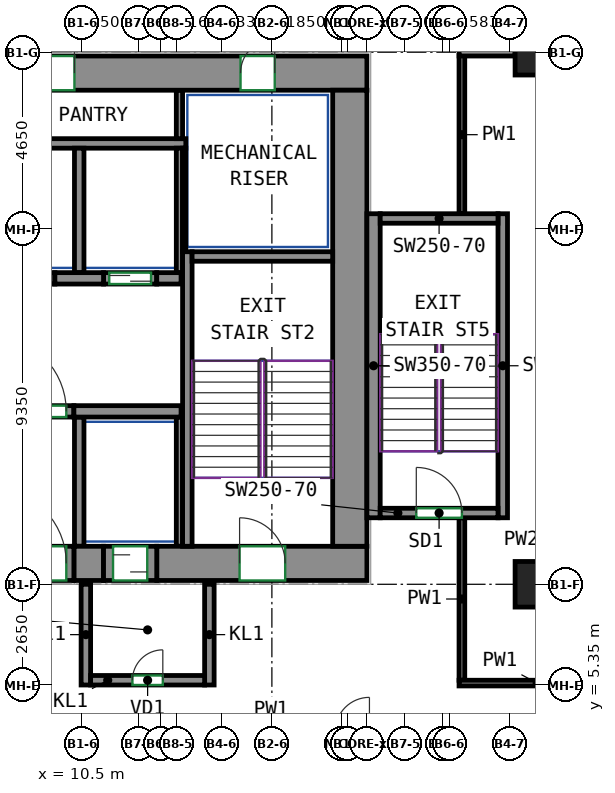
"""IFC4 building model, lengths in metres.
Left out: names, types, materials, properties, quantities, classifications, styles, units other than length and angle.
Written with IfcOpenShell. Run it as: python <this file> out.ifc"""

import sys

from ifc_helpers import new_model, si_unit, direction, frame, frame_2d, origin, origin_2d, place, context, subcontext, project, spatial, rectangle, extrude, source, transform, mapped, element, fill, save


model = new_model("IFC4")
c1 = context("Model", 3, precision=1e-05, world=origin(), true_north=direction((0.0, 1.0)))
c2 = subcontext(c1, "Body", "Model", "MODEL_VIEW")
j1 = project(units=[si_unit("LENGTHUNIT", "METRE"), si_unit("PLANEANGLEUNIT", "RADIAN")], contexts=[c1])
p1 = place(None, origin())
s1 = spatial("IfcSite", under=j1, at=p1, CompositionType="ELEMENT")
p2 = place(p1, origin())
s2 = spatial("IfcBuilding", under=s1, at=p2, CompositionType="ELEMENT")
p3 = place(p2, frame((0.0, 0.0, 116.6)))
s3 = spatial("IfcBuildingStorey", under=s2, at=p3, CompositionType="ELEMENT", Elevation=116.6)
m1 = source(origin(), c2, "Body", "SweptSolid", [
    extrude(rectangle(XDim=1.2, YDim=1.2, at=origin_2d()), origin(), (0.0, 0.0, 1.0), 3.72),
])
for number, where, z_axis, x_axis in (
    (1, (22.5, 8.0, 0.0), (0.0, 0.0, 1.0), (1.0, 0.0, 0.0)),
    (2, (22.5, 22.0, 0.0), (0.0, 0.0, 1.0), (1.0, 0.0, 0.0)),
):
    element("IfcColumn", number, at=place(p3, frame(where, z_axis=z_axis, x_axis=x_axis)), inside=s3, PredefinedType="COLUMN", context=c2, shape_type="MappedRepresentation", body=[
        mapped(m1, transform((0.0, 0.0, 0.0))),
    ])
m2 = source(origin(), c2, "Body", "SweptSolid", [
    extrude(rectangle(XDim=0.78, YDim=0.9, at=frame_2d((0.39, 0.0))), origin(), (0.0, 0.0, 1.0), 3.72),
])
p4 = place(p3, frame((10.29, 8.55, 0.0), z_axis=(0.0, 0.0, 1.0), x_axis=(1.0, 0.0, 0.0)))
e3 = element("IfcWall", 3, at=p4, inside=s3, PredefinedType="SHEAR", context=c2, shape_type="MappedRepresentation", body=[
    mapped(m2, transform((0.0, 0.0, 0.0))),
])
m3 = source(origin(), c2, "Body", "SweptSolid", [
    extrude(rectangle(XDim=5.53, YDim=0.9, at=frame_2d((2.765, 0.0))), origin(), (0.0, 0.0, 1.0), 3.72),
])
p5 = place(p3, frame((12.47, 8.55, 0.0), z_axis=(0.0, 0.0, 1.0), x_axis=(1.0, 0.0, 0.0)))
e4 = element("IfcWall", 4, at=p5, inside=s3, PredefinedType="SHEAR", context=c2, shape_type="MappedRepresentation", body=[
    mapped(m3, transform((0.0, 0.0, 0.0))),
])
p6 = place(p5, frame((2.18, 0.0, 0.0)))
e5 = element("IfcOpeningElement", 5, at=p6, cuts=e4, PredefinedType="OPENING", context=c2, shape_type="SweptSolid", body=[
    extrude(rectangle(XDim=1.2, YDim=2.1, at=frame_2d((0.6, 1.05))), frame((0.0, 0.46, 0.0), z_axis=(0.0, -1.0, 0.0), x_axis=(1.0, 0.0, 0.0)), (0.0, 0.0, 1.0), 0.92),
])
m4 = source(origin(), c2, "Body", "SweptSolid", [
    extrude(rectangle(XDim=33.9, YDim=0.9, at=frame_2d((16.95, 0.0))), origin(), (0.0, 0.0, 1.0), 3.72),
])
p7 = place(p3, frame((-15.9, 21.45, 0.0), z_axis=(0.0, 0.0, 1.0), x_axis=(1.0, 0.0, 0.0)))
e6 = element("IfcWall", 6, at=p7, inside=s3, PredefinedType="SHEAR", context=c2, shape_type="MappedRepresentation", body=[
    mapped(m4, transform((0.0, 0.0, 0.0))),
])
p8 = place(p7, frame((7.12, 0.0, 0.0)))
e7 = element("IfcOpeningElement", 7, at=p8, cuts=e6, PredefinedType="OPENING", context=c2, shape_type="SweptSolid", body=[
    extrude(rectangle(XDim=0.9, YDim=2.1, at=frame_2d((0.45, 1.05))), frame((0.0, 0.46, 0.0), z_axis=(0.0, -1.0, 0.0), x_axis=(1.0, 0.0, 0.0)), (0.0, 0.0, 1.0), 0.92),
])
p9 = place(p7, frame((11.1, 0.0, 0.0)))
e8 = element("IfcOpeningElement", 8, at=p9, cuts=e6, PredefinedType="OPENING", context=c2, shape_type="SweptSolid", body=[
    extrude(rectangle(XDim=0.9, YDim=2.1, at=frame_2d((0.45, 1.05))), frame((0.0, 0.46, 0.0), z_axis=(0.0, -1.0, 0.0), x_axis=(1.0, 0.0, 0.0)), (0.0, 0.0, 1.0), 0.92),
])
p10 = place(p7, frame((14.45, 0.0, 0.0)))
e9 = element("IfcOpeningElement", 9, at=p10, cuts=e6, PredefinedType="OPENING", context=c2, shape_type="SweptSolid", body=[
    extrude(rectangle(XDim=0.9, YDim=2.1, at=frame_2d((0.45, 1.05))), frame((0.0, 0.46, 0.0), z_axis=(0.0, -1.0, 0.0), x_axis=(1.0, 0.0, 0.0)), (0.0, 0.0, 1.0), 0.92),
])
p11 = place(p7, frame((19.274, 0.0, 0.0)))
e10 = element("IfcOpeningElement", 10, at=p11, cuts=e6, PredefinedType="OPENING", context=c2, shape_type="SweptSolid", body=[
    extrude(rectangle(XDim=0.9, YDim=2.1, at=frame_2d((0.45, 1.05))), frame((0.0, 0.46, 0.0), z_axis=(0.0, -1.0, 0.0), x_axis=(1.0, 0.0, 0.0)), (0.0, 0.0, 1.0), 0.92),
])
p12 = place(p7, frame((25.304, 0.0, 0.0)))
e11 = element("IfcOpeningElement", 11, at=p12, cuts=e6, PredefinedType="OPENING", context=c2, shape_type="SweptSolid", body=[
    extrude(rectangle(XDim=0.9, YDim=2.1, at=frame_2d((0.45, 1.05))), frame((0.0, 0.46, 0.0), z_axis=(0.0, -1.0, 0.0), x_axis=(1.0, 0.0, 0.0)), (0.0, 0.0, 1.0), 0.92),
])
p13 = place(p7, frame((2.425, 0.0, 0.0)))
e12 = element("IfcOpeningElement", 12, at=p13, cuts=e6, PredefinedType="OPENING", context=c2, shape_type="SweptSolid", body=[
    extrude(rectangle(XDim=0.9, YDim=2.1, at=frame_2d((0.45, 1.05))), frame((0.0, 0.46, 0.0), z_axis=(0.0, -1.0, 0.0), x_axis=(1.0, 0.0, 0.0)), (0.0, 0.0, 1.0), 0.92),
])
p14 = place(p7, frame((30.575, 0.0, 0.0)))
e13 = element("IfcOpeningElement", 13, at=p14, cuts=e6, PredefinedType="OPENING", context=c2, shape_type="SweptSolid", body=[
    extrude(rectangle(XDim=0.9, YDim=2.1, at=frame_2d((0.45, 1.05))), frame((0.0, 0.46, 0.0), z_axis=(0.0, -1.0, 0.0), x_axis=(1.0, 0.0, 0.0)), (0.0, 0.0, 1.0), 0.92),
])
m5 = source(origin(), c2, "Body", "SweptSolid", [
    extrude(rectangle(XDim=12.0, YDim=0.9, at=frame_2d((6.0, 0.0))), origin(), (0.0, 0.0, 1.0), 3.72),
])
p15 = place(p3, frame((17.55, 9.0, 0.0), z_axis=(0.0, 0.0, 1.0), x_axis=(0.0, 1.0, 0.0)))
e14 = element("IfcWall", 14, at=p15, inside=s3, PredefinedType="SHEAR", context=c2, shape_type="MappedRepresentation", body=[
    mapped(m5, transform((0.0, 0.0, 0.0))),
])
m6 = source(origin(), c2, "Body", "SweptSolid", [
    extrude(rectangle(XDim=7.75, YDim=0.25, at=frame_2d((3.875, 0.0))), origin(), (0.0, 0.0, 1.0), 3.72),
])
p16 = place(p3, frame((13.275, 9.0, 0.0), z_axis=(0.0, 0.0, 1.0), x_axis=(0.0, 1.0, 0.0)))
e15 = element("IfcWall", 15, at=p16, inside=s3, PredefinedType="SHEAR", context=c2, shape_type="MappedRepresentation", body=[
    mapped(m6, transform((0.0, 0.0, 0.0))),
])
m7 = source(origin(), c2, "Body", "SweptSolid", [
    extrude(rectangle(XDim=3.7, YDim=0.25, at=frame_2d((1.85, 0.0))), origin(), (0.0, 0.0, 1.0), 3.72),
])
p17 = place(p3, frame((13.4, 16.625, 0.0), z_axis=(0.0, 0.0, 1.0), x_axis=(1.0, 0.0, 0.0)))
e16 = element("IfcWall", 16, at=p17, inside=s3, PredefinedType="SHEAR", context=c2, shape_type="MappedRepresentation", body=[
    mapped(m7, transform((0.0, 0.0, 0.0))),
])
m8 = source(origin(), c2, "Body", "SweptSolid", [
    extrude(rectangle(XDim=8.0, YDim=0.35, at=frame_2d((4.0, 0.0))), origin(), (0.0, 0.0, 1.0), 3.72),
])
p18 = place(p3, frame((18.175, 9.75, 0.0), z_axis=(0.0, 0.0, 1.0), x_axis=(0.0, 1.0, 0.0)))
e17 = element("IfcWall", 17, at=p18, inside=s3, PredefinedType="SHEAR", context=c2, shape_type="MappedRepresentation", body=[
    mapped(m8, transform((0.0, 0.0, 0.0))),
])
m9 = source(origin(), c2, "Body", "SweptSolid", [
    extrude(rectangle(XDim=8.0, YDim=0.25, at=frame_2d((4.0, 0.0))), origin(), (0.0, 0.0, 1.0), 3.72),
])
p19 = place(p3, frame((21.575, 9.75, 0.0), z_axis=(0.0, 0.0, 1.0), x_axis=(0.0, 1.0, 0.0)))
e18 = element("IfcWall", 18, at=p19, inside=s3, PredefinedType="SHEAR", context=c2, shape_type="MappedRepresentation", body=[
    mapped(m9, transform((0.0, 0.0, 0.0))),
])
m10 = source(origin(), c2, "Body", "SweptSolid", [
    extrude(rectangle(XDim=3.1, YDim=0.25, at=frame_2d((1.55, 0.0))), origin(), (0.0, 0.0, 1.0), 3.72),
])
p20 = place(p3, frame((18.35, 9.875, 0.0), z_axis=(0.0, 0.0, 1.0), x_axis=(1.0, 0.0, 0.0)))
e19 = element("IfcWall", 19, at=p20, inside=s3, PredefinedType="SHEAR", context=c2, shape_type="MappedRepresentation", body=[
    mapped(m10, transform((0.0, 0.0, 0.0))),
])
p21 = place(p20, frame((0.95, 0.0, 0.0)))
e20 = element("IfcOpeningElement", 20, at=p21, cuts=e19, PredefinedType="OPENING", context=c2, shape_type="SweptSolid", body=[
    extrude(rectangle(XDim=1.2, YDim=2.1, at=frame_2d((0.6, 1.05))), frame((0.0, 0.135, 0.0), z_axis=(0.0, -1.0, 0.0), x_axis=(1.0, 0.0, 0.0)), (0.0, 0.0, 1.0), 0.27),
])
p22 = place(p3, frame((18.35, 17.625, 0.0), z_axis=(0.0, 0.0, 1.0), x_axis=(1.0, 0.0, 0.0)))
e21 = element("IfcWall", 21, at=p22, inside=s3, PredefinedType="SHEAR", context=c2, shape_type="MappedRepresentation", body=[
    mapped(m10, transform((0.0, 0.0, 0.0))),
])
m11 = source(origin(), c2, "Body", "SweptSolid", [
    extrude(rectangle(XDim=2.82, YDim=0.3, at=frame_2d((1.41, 0.0))), origin(), (0.0, 0.0, 1.0), 3.72),
])
p23 = place(p3, frame((10.29, 12.55, 0.0), z_axis=(0.0, 0.0, 1.0), x_axis=(1.0, 0.0, 0.0)))
e22 = element("IfcWall", 22, at=p23, inside=s3, PredefinedType="SHEAR", context=c2, shape_type="MappedRepresentation", body=[
    mapped(m11, transform((0.0, 0.0, 0.0))),
])
m12 = source(origin(), c2, "Body", "SweptSolid", [
    extrude(rectangle(XDim=1.28, YDim=0.3, at=frame_2d((0.64, 0.0))), origin(), (0.0, 0.0, 1.0), 3.72),
])
p24 = place(p3, frame((9.79, 16.05, 0.0), z_axis=(0.0, 0.0, 1.0), x_axis=(1.0, 0.0, 0.0)))
e23 = element("IfcWall", 23, at=p24, inside=s3, PredefinedType="SHEAR", context=c2, shape_type="MappedRepresentation", body=[
    mapped(m12, transform((0.0, 0.0, 0.0))),
])
m13 = source(origin(), c2, "Body", "SweptSolid", [
    extrude(rectangle(XDim=0.64, YDim=0.3, at=frame_2d((0.32, 0.0))), origin(), (0.0, 0.0, 1.0), 3.72),
])
p25 = place(p3, frame((12.47, 16.05, 0.0), z_axis=(0.0, 0.0, 1.0), x_axis=(1.0, 0.0, 0.0)))
e24 = element("IfcWall", 24, at=p25, inside=s3, PredefinedType="SHEAR", context=c2, shape_type="MappedRepresentation", body=[
    mapped(m13, transform((0.0, 0.0, 0.0))),
])
m14 = source(origin(), c2, "Body", "SweptSolid", [
    extrude(rectangle(XDim=1.4, YDim=0.3, at=frame_2d((0.7, 0.0))), origin(), (0.0, 0.0, 1.0), 3.72),
])
p26 = place(p3, frame((11.07, 16.05, 0.0), z_axis=(0.0, 0.0, 1.0), x_axis=(1.0, 0.0, 0.0)))
e25 = element("IfcWall", 25, at=p26, inside=s3, PredefinedType="PARTITIONING", context=c2, shape_type="MappedRepresentation", body=[
    mapped(m14, transform((0.0, 0.0, 0.0))),
])
p27 = place(p26, frame((0.15, 0.0, 0.0)))
e26 = element("IfcOpeningElement", 26, at=p27, cuts=e25, PredefinedType="OPENING", context=c2, shape_type="SweptSolid", body=[
    extrude(rectangle(XDim=1.1, YDim=2.1, at=frame_2d((0.55, 1.05))), frame((0.0, 0.16, 0.0), z_axis=(0.0, -1.0, 0.0), x_axis=(1.0, 0.0, 0.0)), (0.0, 0.0, 1.0), 0.32),
])
m15 = source(origin(), c2, "Body", "SweptSolid", [
    extrude(rectangle(XDim=2.4, YDim=0.3, at=frame_2d((1.2, 0.0))), origin(), (0.0, 0.0, 1.0), 3.72),
])
p28 = place(p3, frame((7.89, 12.55, 0.0), z_axis=(0.0, 0.0, 1.0), x_axis=(1.0, 0.0, 0.0)))
e27 = element("IfcWall", 27, at=p28, inside=s3, PredefinedType="PARTITIONING", context=c2, shape_type="MappedRepresentation", body=[
    mapped(m15, transform((0.0, 0.0, 0.0))),
])
p29 = place(p28, frame((0.2, 0.0, 0.0)))
e28 = element("IfcOpeningElement", 28, at=p29, cuts=e27, PredefinedType="OPENING", context=c2, shape_type="SweptSolid", body=[
    extrude(rectangle(XDim=2.0, YDim=2.1, at=frame_2d((1.0, 1.05))), frame((0.0, 0.16, 0.0), z_axis=(0.0, -1.0, 0.0), x_axis=(1.0, 0.0, 0.0)), (0.0, 0.0, 1.0), 0.32),
])
m16 = source(origin(), c2, "Body", "SweptSolid", [
    extrude(rectangle(XDim=1.4, YDim=0.3, at=frame_2d((0.7, 0.0))), origin(), (0.0, 0.0, 1.0), 3.72),
])
p30 = place(p3, frame((8.39, 16.05, 0.0), z_axis=(0.0, 0.0, 1.0), x_axis=(1.0, 0.0, 0.0)))
e29 = element("IfcWall", 29, at=p30, inside=s3, PredefinedType="PARTITIONING", context=c2, shape_type="MappedRepresentation", body=[
    mapped(m16, transform((0.0, 0.0, 0.0))),
])
m17 = source(origin(), c2, "Body", "SweptSolid", [
    extrude(rectangle(XDim=2.65, YDim=0.25, at=frame_2d((1.325, 0.0))), origin(), (0.0, 0.0, 1.0), 3.72),
])
for number, where, z_axis, x_axis in (
    (30, (10.605, 5.35, 0.0), (0.0, 0.0, 1.0), (0.0, 1.0, 0.0)),
    (31, (13.855, 5.35, 0.0), (0.0, 0.0, 1.0), (0.0, 1.0, 0.0)),
):
    element("IfcWall", number, at=place(p3, frame(where, z_axis=z_axis, x_axis=x_axis)), inside=s3, PredefinedType="PARTITIONING", context=c2, shape_type="MappedRepresentation", body=[
        mapped(m17, transform((0.0, 0.0, 0.0))),
    ])
m18 = source(origin(), c2, "Body", "SweptSolid", [
    extrude(rectangle(XDim=3.0, YDim=0.25, at=frame_2d((1.5, 0.0))), origin(), (0.0, 0.0, 1.0), 3.72),
])
p31 = place(p3, frame((10.73, 5.475, 0.0), z_axis=(0.0, 0.0, 1.0), x_axis=(1.0, 0.0, 0.0)))
e32 = element("IfcWall", 32, at=p31, inside=s3, PredefinedType="PARTITIONING", context=c2, shape_type="MappedRepresentation", body=[
    mapped(m18, transform((0.0, 0.0, 0.0))),
])
p32 = place(p31, frame((1.1, 0.0, 0.0)))
e33 = element("IfcOpeningElement", 33, at=p32, cuts=e32, PredefinedType="OPENING", context=c2, shape_type="SweptSolid", body=[
    extrude(rectangle(XDim=0.8, YDim=2.0, at=frame_2d((0.4, 1.0))), frame((0.0, 0.135, 0.0), z_axis=(0.0, -1.0, 0.0), x_axis=(1.0, 0.0, 0.0)), (0.0, 0.0, 1.0), 0.27),
])
m19 = source(origin(), c2, "Body", "SweptSolid", [
    extrude(rectangle(XDim=19.01, YDim=0.25, at=frame_2d((9.505, 0.0))), origin(), (0.0, 0.0, 1.0), 3.72),
])
p33 = place(p3, frame((-5.775, 19.6, 0.0), z_axis=(0.0, 0.0, 1.0), x_axis=(1.0, 0.0, 0.0)))
e34 = element("IfcWall", 34, at=p33, inside=s3, PredefinedType="PARTITIONING", context=c2, shape_type="MappedRepresentation", body=[
    mapped(m19, transform((0.0, 0.0, 0.0))),
])
m20 = source(origin(), c2, "Body", "SweptSolid", [
    extrude(rectangle(XDim=3.275, YDim=0.165, at=frame_2d((1.638, 0.0))), origin(), (0.0, 0.0, 1.0), 3.72),
])
p34 = place(p3, frame((13.067, 16.2, 0.0), z_axis=(0.0, 0.0, 1.0), x_axis=(0.0, 1.0, 0.0)))
e35 = element("IfcWall", 35, at=p34, inside=s3, PredefinedType="PARTITIONING", context=c2, shape_type="MappedRepresentation", body=[
    mapped(m20, transform((0.0, 0.0, 0.0))),
])
m21 = source(origin(), c2, "Body", "SweptSolid", [
    extrude(rectangle(XDim=1.275, YDim=0.165, at=frame_2d((0.637, 0.0))), origin(), (0.0, 0.0, 1.0), 3.72),
])
p35 = place(p3, frame((13.067, 19.725, 0.0), z_axis=(0.0, 0.0, 1.0), x_axis=(0.0, 1.0, 0.0)))
e36 = element("IfcWall", 36, at=p35, inside=s3, PredefinedType="PARTITIONING", context=c2, shape_type="MappedRepresentation", body=[
    mapped(m21, transform((0.0, 0.0, 0.0))),
])
m22 = source(origin(), c2, "Body", "SweptSolid", [
    extrude(rectangle(XDim=3.275, YDim=0.25, at=frame_2d((1.638, 0.0))), origin(), (0.0, 0.0, 1.0), 3.72),
])
p36 = place(p3, frame((10.43, 16.2, 0.0), z_axis=(0.0, 0.0, 1.0), x_axis=(0.0, 1.0, 0.0)))
e37 = element("IfcWall", 37, at=p36, inside=s3, PredefinedType="PARTITIONING", context=c2, shape_type="MappedRepresentation", body=[
    mapped(m22, transform((0.0, 0.0, 0.0))),
])
m23 = source(origin(), c2, "Body", "SweptSolid", [
    extrude(rectangle(XDim=2.725, YDim=0.085, at=frame_2d((1.363, 0.0))), origin(), (0.0, 0.0, 1.0), 3.72),
])
p37 = place(p3, frame((13.192, 16.75, 0.0), z_axis=(0.0, 0.0, 1.0), x_axis=(0.0, 1.0, 0.0)))
e38 = element("IfcWall", 38, at=p37, inside=s3, PredefinedType="PARTITIONING", context=c2, shape_type="MappedRepresentation", body=[
    mapped(m23, transform((0.0, 0.0, 0.0))),
])
m24 = source(origin(), c2, "Body", "SweptSolid", [
    extrude(rectangle(XDim=3.4, YDim=0.25, at=frame_2d((1.7, 0.0))), origin(), (0.0, 0.0, 1.0), 3.72),
])
p38 = place(p3, frame((10.43, 9.0, 0.0), z_axis=(0.0, 0.0, 1.0), x_axis=(0.0, 1.0, 0.0)))
e39 = element("IfcWall", 39, at=p38, inside=s3, PredefinedType="PARTITIONING", context=c2, shape_type="MappedRepresentation", body=[
    mapped(m24, transform((0.0, 0.0, 0.0))),
])
m25 = source(origin(), c2, "Body", "SweptSolid", [
    extrude(rectangle(XDim=3.4, YDim=0.165, at=frame_2d((1.7, 0.0))), origin(), (0.0, 0.0, 1.0), 3.72),
])
p39 = place(p3, frame((13.067, 9.0, 0.0), z_axis=(0.0, 0.0, 1.0), x_axis=(0.0, 1.0, 0.0)))
e40 = element("IfcWall", 40, at=p39, inside=s3, PredefinedType="PARTITIONING", context=c2, shape_type="MappedRepresentation", body=[
    mapped(m25, transform((0.0, 0.0, 0.0))),
])
m26 = source(origin(), c2, "Body", "SweptSolid", [
    extrude(rectangle(XDim=2.4, YDim=0.9, at=frame_2d((1.2, 0.0))), origin(), (0.0, 0.0, 1.0), 2.7),
])
p40 = place(p3, frame((7.89, 8.55, 0.0), z_axis=(0.0, 0.0, 1.0), x_axis=(1.0, 0.0, 0.0)))
e41 = element("IfcWall", 41, at=p40, inside=s3, PredefinedType="PARTITIONING", context=c2, shape_type="MappedRepresentation", body=[
    mapped(m26, transform((0.0, 0.0, 0.0))),
])
p41 = place(p40, frame((0.2, 0.0, 0.0)))
e42 = element("IfcOpeningElement", 42, at=p41, cuts=e41, PredefinedType="OPENING", context=c2, shape_type="SweptSolid", body=[
    extrude(rectangle(XDim=2.0, YDim=2.1, at=frame_2d((1.0, 1.05))), frame((0.0, 0.46, 0.0), z_axis=(0.0, -1.0, 0.0), x_axis=(1.0, 0.0, 0.0)), (0.0, 0.0, 1.0), 0.92),
])
m27 = source(origin(), c2, "Body", "SweptSolid", [
    extrude(rectangle(XDim=1.4, YDim=0.9, at=frame_2d((0.7, 0.0))), origin(), (0.0, 0.0, 1.0), 2.7),
])
p42 = place(p3, frame((11.07, 8.55, 0.0), z_axis=(0.0, 0.0, 1.0), x_axis=(1.0, 0.0, 0.0)))
e43 = element("IfcWall", 43, at=p42, inside=s3, PredefinedType="PARTITIONING", context=c2, shape_type="MappedRepresentation", body=[
    mapped(m27, transform((0.0, 0.0, 0.0))),
])
p43 = place(p42, frame((0.25, 0.0, 0.0)))
e44 = element("IfcOpeningElement", 44, at=p43, cuts=e43, PredefinedType="OPENING", context=c2, shape_type="SweptSolid", body=[
    extrude(rectangle(XDim=0.9, YDim=2.1, at=frame_2d((0.45, 1.05))), frame((0.0, 0.46, 0.0), z_axis=(0.0, -1.0, 0.0), x_axis=(1.0, 0.0, 0.0)), (0.0, 0.0, 1.0), 0.92),
])
p44 = place(p3, frame((20.5, 17.75, 0.0), z_axis=(0.0, 0.0, 1.0), x_axis=(0.0, 1.0, 0.0)))
e45 = element("IfcWall", 45, at=p44, inside=s3, PredefinedType="PARTITIONING", context=c2, shape_type="SweptSolid", body=[
    extrude(rectangle(XDim=4.16, YDim=0.15, at=frame_2d((2.08, 0.0))), origin(), (0.0, 0.0, 1.0), 3.72),
])
p45 = place(p3, frame((20.5, 5.475, 0.0), z_axis=(0.0, 0.0, 1.0), x_axis=(0.0, 1.0, 0.0)))
e46 = element("IfcWall", 46, at=p45, inside=s3, PredefinedType="PARTITIONING", context=c2, shape_type="SweptSolid", body=[
    extrude(rectangle(XDim=4.275, YDim=0.15, at=frame_2d((2.137, 0.0))), origin(), (0.0, 0.0, 1.0), 3.72),
])
p46 = place(p3, frame((20.425, 5.4, 0.0), z_axis=(0.0, 0.0, 1.0), x_axis=(1.0, 0.0, 0.0)))
e47 = element("IfcWall", 47, at=p46, inside=s3, PredefinedType="PARTITIONING", context=c2, shape_type="SweptSolid", body=[
    extrude(rectangle(XDim=6.85, YDim=0.15, at=frame_2d((3.425, 0.0))), origin(), (0.0, 0.0, 1.0), 3.72),
])
p47 = place(p46, frame((2.752, 0.0, 0.0)))
e48 = element("IfcOpeningElement", 48, at=p47, cuts=e47, PredefinedType="OPENING", context=c2, shape_type="SweptSolid", body=[
    extrude(rectangle(XDim=1.0, YDim=2.1, at=frame_2d((0.5, 1.05))), frame((0.0, 0.085, 0.0), z_axis=(0.0, -1.0, 0.0), x_axis=(1.0, 0.0, 0.0)), (0.0, 0.0, 1.0), 0.17),
])
p48 = place(p3, frame((20.426, 22.0, 0.0), z_axis=(0.0, 0.0, 1.0), x_axis=(1.0, 0.0, 0.0)))
e49 = element("IfcWall", 49, at=p48, inside=s3, PredefinedType="PARTITIONING", context=c2, shape_type="SweptSolid", body=[
    extrude(rectangle(XDim=1.474, YDim=0.2, at=frame_2d((0.737, 0.0))), origin(), (0.0, 0.0, 1.0), 3.72),
])
p49 = place(p29, origin())
e50 = element("IfcDoor", 50, at=p49, inside=s3, OperationType="DOUBLE_DOOR_SINGLE_SWING", PredefinedType="DOOR", context=c2, shape_type="SweptSolid", body=[
    extrude(rectangle(XDim=2.0, YDim=2.1, at=frame_2d((1.0, 1.05))), frame((0.0, 0.025, 0.0), z_axis=(0.0, -1.0, 0.0), x_axis=(1.0, 0.0, 0.0)), (0.0, 0.0, 1.0), 0.05),
])
fill(e28, e50)
p50 = place(p41, origin())
e51 = element("IfcDoor", 51, at=p50, inside=s3, OperationType="DOUBLE_DOOR_SINGLE_SWING", PredefinedType="DOOR", context=c2, shape_type="SweptSolid", body=[
    extrude(rectangle(XDim=2.0, YDim=2.1, at=frame_2d((1.0, 1.05))), frame((0.0, 0.355, 0.0), z_axis=(0.0, -1.0, 0.0), x_axis=(1.0, 0.0, 0.0)), (0.0, 0.0, 1.0), 0.05),
])
fill(e42, e51)
p51 = place(p32, origin())
e52 = element("IfcDoor", 52, at=p51, inside=s3, OperationType="SINGLE_SWING_RIGHT", PredefinedType="DOOR", context=c2, shape_type="SweptSolid", body=[
    extrude(rectangle(XDim=0.8, YDim=2.0, at=frame_2d((0.4, 1.0))), frame((0.0, 0.025, 0.0), z_axis=(0.0, -1.0, 0.0), x_axis=(1.0, 0.0, 0.0)), (0.0, 0.0, 1.0), 0.05),
])
fill(e33, e52)
p52 = place(p43, origin())
e53 = element("IfcDoor", 53, at=p52, inside=s3, OperationType="SLIDING_TO_LEFT", PredefinedType="DOOR", context=c2, shape_type="SweptSolid", body=[
    extrude(rectangle(XDim=0.9, YDim=2.1, at=frame_2d((0.45, 1.05))), frame((0.0, 0.355, 0.0), z_axis=(0.0, -1.0, 0.0), x_axis=(1.0, 0.0, 0.0)), (0.0, 0.0, 1.0), 0.05),
])
fill(e44, e53)
p53 = place(p27, origin())
e54 = element("IfcDoor", 54, at=p53, inside=s3, OperationType="DOUBLE_DOOR_SLIDING", PredefinedType="DOOR", context=c2, shape_type="SweptSolid", body=[
    extrude(rectangle(XDim=1.1, YDim=2.1, at=frame_2d((0.55, 1.05))), frame((0.0, 0.025, 0.0), z_axis=(0.0, -1.0, 0.0), x_axis=(1.0, 0.0, 0.0)), (0.0, 0.0, 1.0), 0.05),
])
fill(e26, e54)
p54 = place(p12, origin())
e55 = element("IfcDoor", 55, at=p54, inside=s3, OperationType="SINGLE_SWING_RIGHT", PredefinedType="DOOR", context=c2, shape_type="SweptSolid", body=[
    extrude(rectangle(XDim=0.9, YDim=2.1, at=frame_2d((0.45, 1.05))), frame((0.0, -0.305, 0.0), z_axis=(0.0, -1.0, 0.0), x_axis=(1.0, 0.0, 0.0)), (0.0, 0.0, 1.0), 0.05),
])
fill(e11, e55)
p55 = place(p14, origin())
e56 = element("IfcDoor", 56, at=p55, inside=s3, OperationType="SINGLE_SWING_RIGHT", PredefinedType="DOOR", context=c2, shape_type="SweptSolid", body=[
    extrude(rectangle(XDim=0.9, YDim=2.1, at=frame_2d((0.45, 1.05))), frame((0.0, -0.305, 0.0), z_axis=(0.0, -1.0, 0.0), x_axis=(1.0, 0.0, 0.0)), (0.0, 0.0, 1.0), 0.05),
])
fill(e13, e56)
p56 = place(p6, origin())
e57 = element("IfcDoor", 57, at=p56, inside=s3, OperationType="DOUBLE_DOOR_SINGLE_SWING", PredefinedType="DOOR", context=c2, shape_type="SweptSolid", body=[
    extrude(rectangle(XDim=1.2, YDim=2.1, at=frame_2d((0.6, 1.05))), frame((0.0, 0.355, 0.0), z_axis=(0.0, -1.0, 0.0), x_axis=(1.0, 0.0, 0.0)), (0.0, 0.0, 1.0), 0.05),
])
fill(e5, e57)
p57 = place(p21, origin())
e58 = element("IfcDoor", 58, at=p57, inside=s3, OperationType="DOUBLE_DOOR_SINGLE_SWING", PredefinedType="DOOR", context=c2, shape_type="SweptSolid", body=[
    extrude(rectangle(XDim=1.2, YDim=2.1, at=frame_2d((0.6, 1.05))), frame((0.0, 0.025, 0.0), z_axis=(0.0, -1.0, 0.0), x_axis=(1.0, 0.0, 0.0)), (0.0, 0.0, 1.0), 0.05),
])
fill(e20, e58)
save(model, sys.argv[1])
